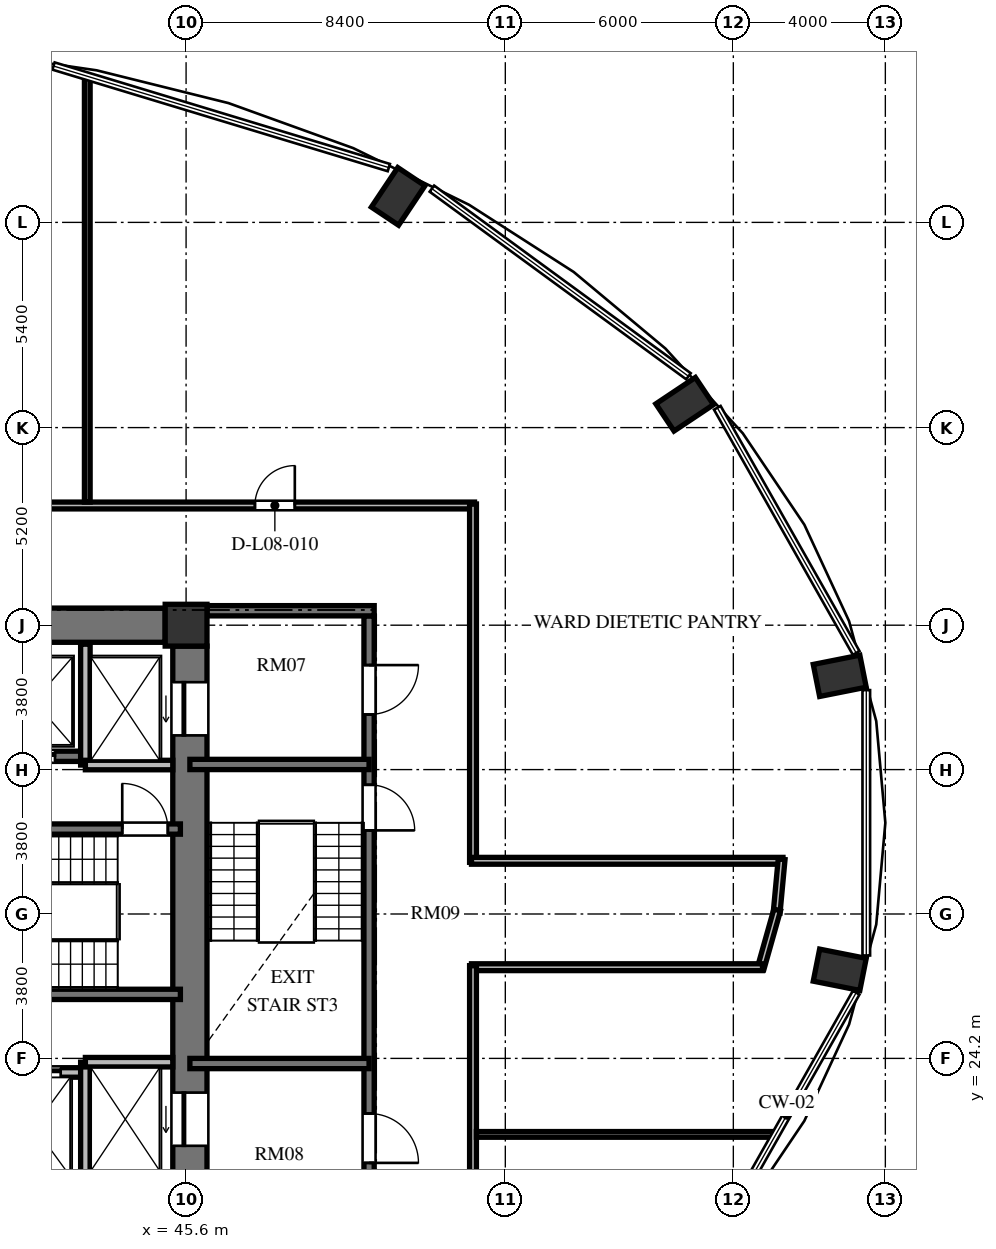
"""IFC4 building model, lengths in metres.
Left out: names, types, materials, properties, quantities, classifications, styles, units other than length and angle.
Written with IfcOpenShell. Run it as: python <this file> out.ifc"""

import sys

from ifc_helpers import new_model, si_unit, direction, frame, frame_2d, origin, origin_2d, place, context, subcontext, project, spatial, rectangle, extrude, element, fill, save


model = new_model("IFC4")
c1 = context("Model", 3, precision=1e-05, world=origin(), true_north=direction((0.0, 1.0)))
c2 = subcontext(c1, "Body", "Model", "MODEL_VIEW")
j1 = project(units=[si_unit("LENGTHUNIT", "METRE"), si_unit("PLANEANGLEUNIT", "RADIAN")], contexts=[c1])
p1 = place(None, origin())
s1 = spatial("IfcSite", under=j1, at=p1, CompositionType="ELEMENT")
p2 = place(p1, origin())
s2 = spatial("IfcBuilding", under=s1, at=p2, CompositionType="ELEMENT")
p3 = place(p2, frame((0.0, 0.0, 36.144)))
s3 = spatial("IfcBuildingStorey", under=s2, at=p3, CompositionType="ELEMENT", Elevation=36.144)
for number, where, z_axis, x_axis in (
    (1, (62.8, 26.532, 0.0), (0.0, 0.0, 1.0), (0.981, -0.195, 0.0)),
    (2, (62.8, 34.268, 0.0), (0.0, 0.0, 1.0), (0.981, 0.195, 0.0)),
    (3, (58.72, 41.414, 0.0), (0.0, 0.0, 1.0), (0.831, 0.556, 0.0)),
    (4, (51.181, 46.884, 0.0), (0.0, 0.0, 1.0), (0.556, 0.831, 0.0)),
):
    element("IfcColumn", number, at=place(p3, frame(where, z_axis=z_axis, x_axis=x_axis)), inside=s3, PredefinedType="COLUMN", context=c2, shape_type="SweptSolid", body=[
        extrude(rectangle(XDim=1.25, YDim=0.86, at=origin_2d()), origin(), (0.0, 0.0, 1.0), 3.648),
    ])
p4 = place(p3, frame((45.6, 35.6, 0.0), z_axis=(0.0, 0.0, 1.0), x_axis=(1.0, 0.0, 0.0)))
e5 = element("IfcColumn", 5, at=p4, inside=s3, PredefinedType="COLUMN", context=c2, shape_type="SweptSolid", body=[
    extrude(rectangle(XDim=1.1, YDim=1.1, at=origin_2d()), origin(), (0.0, 0.0, 1.0), 3.648),
])
p5 = place(p3, frame((45.7, 20.95, 0.0), z_axis=(0.0, 0.0, 1.0), x_axis=(0.0, 1.0, 0.0)))
e6 = element("IfcWall", 6, at=p5, inside=s3, PredefinedType="SHEAR", context=c2, shape_type="SweptSolid", body=[
    extrude(rectangle(XDim=14.1, YDim=0.9, at=frame_2d((7.05, 0.0))), origin(), (0.0, 0.0, 1.0), 3.648),
])
p6 = place(p5, frame((11.75, 0.0, 0.0)))
e7 = element("IfcOpeningElement", 7, at=p6, cuts=e6, PredefinedType="OPENING", context=c2, shape_type="SweptSolid", body=[
    extrude(rectangle(XDim=1.4, YDim=2.3, at=frame_2d((0.7, 1.15))), frame((0.0, 0.46, 0.0), z_axis=(0.0, -1.0, 0.0), x_axis=(1.0, 0.0, 0.0)), (0.0, 0.0, 1.0), 0.92),
])
p7 = place(p5, frame((0.95, 0.0, 0.0)))
e8 = element("IfcOpeningElement", 8, at=p7, cuts=e6, PredefinedType="OPENING", context=c2, shape_type="SweptSolid", body=[
    extrude(rectangle(XDim=1.4, YDim=2.3, at=frame_2d((0.7, 1.15))), frame((0.0, 0.46, 0.0), z_axis=(0.0, -1.0, 0.0), x_axis=(1.0, 0.0, 0.0)), (0.0, 0.0, 1.0), 0.92),
])
p8 = place(p3, frame((39.75, 35.6, 0.0), z_axis=(0.0, 0.0, 1.0), x_axis=(1.0, 0.0, 0.0)))
e9 = element("IfcWall", 9, at=p8, inside=s3, PredefinedType="SHEAR", context=c2, shape_type="SweptSolid", body=[
    extrude(rectangle(XDim=5.3, YDim=0.9, at=frame_2d((2.65, 0.0))), origin(), (0.0, 0.0, 1.0), 3.648),
])
p9 = place(p3, frame((37.465, 30.235, 0.0), z_axis=(0.0, 0.0, 1.0), x_axis=(1.0, 0.0, 0.0)))
e10 = element("IfcWall", 10, at=p9, inside=s3, PredefinedType="SHEAR", context=c2, shape_type="SweptSolid", body=[
    extrude(rectangle(XDim=7.985, YDim=0.27, at=frame_2d((3.992, 0.0))), origin(), (0.0, 0.0, 1.0), 3.648),
])
p10 = place(p9, frame((6.455, 0.0, 0.0)))
e11 = element("IfcOpeningElement", 11, at=p10, cuts=e10, PredefinedType="OPENING", context=c2, shape_type="SweptSolid", body=[
    extrude(rectangle(XDim=1.2, YDim=2.15, at=frame_2d((0.6, 1.075))), frame((0.0, 0.145, 0.0), z_axis=(0.0, -1.0, 0.0), x_axis=(1.0, 0.0, 0.0)), (0.0, 0.0, 1.0), 0.29),
])
p11 = place(p3, frame((37.465, 25.885, 0.0), z_axis=(0.0, 0.0, 1.0), x_axis=(1.0, 0.0, 0.0)))
e12 = element("IfcWall", 12, at=p11, inside=s3, PredefinedType="SHEAR", context=c2, shape_type="SweptSolid", body=[
    extrude(rectangle(XDim=7.985, YDim=0.27, at=frame_2d((3.992, 0.0))), origin(), (0.0, 0.0, 1.0), 3.648),
])
p12 = place(p3, frame((26.55, 32.15, 0.0), z_axis=(0.0, 0.0, 1.0), x_axis=(1.0, 0.0, 0.0)))
e13 = element("IfcWall", 13, at=p12, inside=s3, PredefinedType="SHEAR", context=c2, shape_type="SweptSolid", body=[
    extrude(rectangle(XDim=16.4, YDim=0.27, at=frame_2d((8.2, 0.0))), origin(), (0.0, 0.0, 1.0), 3.648),
])
p13 = place(p12, frame((1.1, 0.0, 0.0)))
e14 = element("IfcOpeningElement", 14, at=p13, cuts=e13, PredefinedType="OPENING", context=c2, shape_type="SweptSolid", body=[
    extrude(rectangle(XDim=1.1, YDim=2.2, at=frame_2d((0.55, 1.1))), frame((0.0, 0.145, 0.0), z_axis=(0.0, -1.0, 0.0), x_axis=(1.0, 0.0, 0.0)), (0.0, 0.0, 1.0), 0.29),
])
p14 = place(p12, frame((3.7, 0.0, 0.0)))
e15 = element("IfcOpeningElement", 15, at=p14, cuts=e13, PredefinedType="OPENING", context=c2, shape_type="SweptSolid", body=[
    extrude(rectangle(XDim=1.1, YDim=2.2, at=frame_2d((0.55, 1.1))), frame((0.0, 0.145, 0.0), z_axis=(0.0, -1.0, 0.0), x_axis=(1.0, 0.0, 0.0)), (0.0, 0.0, 1.0), 0.29),
])
p15 = place(p12, frame((6.5, 0.0, 0.0)))
e16 = element("IfcOpeningElement", 16, at=p15, cuts=e13, PredefinedType="OPENING", context=c2, shape_type="SweptSolid", body=[
    extrude(rectangle(XDim=1.1, YDim=2.2, at=frame_2d((0.55, 1.1))), frame((0.0, 0.145, 0.0), z_axis=(0.0, -1.0, 0.0), x_axis=(1.0, 0.0, 0.0)), (0.0, 0.0, 1.0), 0.29),
])
p16 = place(p12, frame((9.1, 0.0, 0.0)))
e17 = element("IfcOpeningElement", 17, at=p16, cuts=e13, PredefinedType="OPENING", context=c2, shape_type="SweptSolid", body=[
    extrude(rectangle(XDim=1.1, YDim=2.2, at=frame_2d((0.55, 1.1))), frame((0.0, 0.145, 0.0), z_axis=(0.0, -1.0, 0.0), x_axis=(1.0, 0.0, 0.0)), (0.0, 0.0, 1.0), 0.29),
])
p17 = place(p12, frame((11.9, 0.0, 0.0)))
e18 = element("IfcOpeningElement", 18, at=p17, cuts=e13, PredefinedType="OPENING", context=c2, shape_type="SweptSolid", body=[
    extrude(rectangle(XDim=1.1, YDim=2.2, at=frame_2d((0.55, 1.1))), frame((0.0, 0.145, 0.0), z_axis=(0.0, -1.0, 0.0), x_axis=(1.0, 0.0, 0.0)), (0.0, 0.0, 1.0), 0.29),
])
p18 = place(p12, frame((14.5, 0.0, 0.0)))
e19 = element("IfcOpeningElement", 19, at=p18, cuts=e13, PredefinedType="OPENING", context=c2, shape_type="SweptSolid", body=[
    extrude(rectangle(XDim=1.1, YDim=2.2, at=frame_2d((0.55, 1.1))), frame((0.0, 0.145, 0.0), z_axis=(0.0, -1.0, 0.0), x_axis=(1.0, 0.0, 0.0)), (0.0, 0.0, 1.0), 0.29),
])
p19 = place(p3, frame((26.75, 23.83, 0.0), z_axis=(0.0, 0.0, 1.0), x_axis=(1.0, 0.0, 0.0)))
e20 = element("IfcWall", 20, at=p19, inside=s3, PredefinedType="SOLIDWALL", context=c2, shape_type="SweptSolid", body=[
    extrude(rectangle(XDim=16.2, YDim=0.25, at=frame_2d((8.1, 0.0))), origin(), (0.0, 0.0, 1.0), 3.428),
])
p20 = place(p19, frame((0.9, 0.0, 0.0)))
e21 = element("IfcOpeningElement", 21, at=p20, cuts=e20, PredefinedType="OPENING", context=c2, shape_type="SweptSolid", body=[
    extrude(rectangle(XDim=1.1, YDim=2.2, at=frame_2d((0.55, 1.1))), frame((0.0, 0.135, 0.0), z_axis=(0.0, -1.0, 0.0), x_axis=(1.0, 0.0, 0.0)), (0.0, 0.0, 1.0), 0.27),
])
p21 = place(p19, frame((3.5, 0.0, 0.0)))
e22 = element("IfcOpeningElement", 22, at=p21, cuts=e20, PredefinedType="OPENING", context=c2, shape_type="SweptSolid", body=[
    extrude(rectangle(XDim=1.1, YDim=2.2, at=frame_2d((0.55, 1.1))), frame((0.0, 0.135, 0.0), z_axis=(0.0, -1.0, 0.0), x_axis=(1.0, 0.0, 0.0)), (0.0, 0.0, 1.0), 0.27),
])
p22 = place(p19, frame((6.3, 0.0, 0.0)))
e23 = element("IfcOpeningElement", 23, at=p22, cuts=e20, PredefinedType="OPENING", context=c2, shape_type="SweptSolid", body=[
    extrude(rectangle(XDim=1.1, YDim=2.2, at=frame_2d((0.55, 1.1))), frame((0.0, 0.135, 0.0), z_axis=(0.0, -1.0, 0.0), x_axis=(1.0, 0.0, 0.0)), (0.0, 0.0, 1.0), 0.27),
])
p23 = place(p19, frame((8.9, 0.0, 0.0)))
e24 = element("IfcOpeningElement", 24, at=p23, cuts=e20, PredefinedType="OPENING", context=c2, shape_type="SweptSolid", body=[
    extrude(rectangle(XDim=1.1, YDim=2.2, at=frame_2d((0.55, 1.1))), frame((0.0, 0.135, 0.0), z_axis=(0.0, -1.0, 0.0), x_axis=(1.0, 0.0, 0.0)), (0.0, 0.0, 1.0), 0.27),
])
p24 = place(p19, frame((11.7, 0.0, 0.0)))
e25 = element("IfcOpeningElement", 25, at=p24, cuts=e20, PredefinedType="OPENING", context=c2, shape_type="SweptSolid", body=[
    extrude(rectangle(XDim=1.1, YDim=2.2, at=frame_2d((0.55, 1.1))), frame((0.0, 0.135, 0.0), z_axis=(0.0, -1.0, 0.0), x_axis=(1.0, 0.0, 0.0)), (0.0, 0.0, 1.0), 0.27),
])
p25 = place(p19, frame((14.15, 0.0, 0.0)))
e26 = element("IfcOpeningElement", 26, at=p25, cuts=e20, PredefinedType="OPENING", context=c2, shape_type="SweptSolid", body=[
    extrude(rectangle(XDim=1.4, YDim=2.3, at=frame_2d((0.7, 1.15))), frame((0.0, 0.135, 0.0), z_axis=(0.0, -1.0, 0.0), x_axis=(1.0, 0.0, 0.0)), (0.0, 0.0, 1.0), 0.27),
])
p26 = place(p3, frame((42.95, 31.92, 0.0), z_axis=(0.0, 0.0, 1.0), x_axis=(0.0, 1.0, 0.0)))
e27 = element("IfcWall", 27, at=p26, inside=s3, PredefinedType="SOLIDWALL", context=c2, shape_type="SweptSolid", body=[
    extrude(rectangle(XDim=3.18, YDim=0.25, at=frame_2d((1.59, 0.0))), origin(), (0.0, 0.0, 1.0), 3.428),
])
p27 = place(p3, frame((42.95, 31.92, 0.0), z_axis=(0.0, 0.0, 1.0), x_axis=(1.0, 0.0, 0.0)))
e28 = element("IfcWall", 28, at=p27, inside=s3, PredefinedType="SOLIDWALL", context=c2, shape_type="SweptSolid", body=[
    extrude(rectangle(XDim=2.3, YDim=0.25, at=frame_2d((1.15, 0.0))), origin(), (0.0, 0.0, 1.0), 3.428),
])
p28 = place(p3, frame((42.95, 20.9, 0.0), z_axis=(0.0, 0.0, 1.0), x_axis=(0.0, 1.0, 0.0)))
e29 = element("IfcWall", 29, at=p28, inside=s3, PredefinedType="SOLIDWALL", context=c2, shape_type="SweptSolid", body=[
    extrude(rectangle(XDim=3.2, YDim=0.25, at=frame_2d((1.6, 0.0))), origin(), (0.0, 0.0, 1.0), 3.428),
])
p29 = place(p3, frame((42.95, 24.1, 0.0), z_axis=(0.0, 0.0, 1.0), x_axis=(1.0, 0.0, 0.0)))
e30 = element("IfcWall", 30, at=p29, inside=s3, PredefinedType="SOLIDWALL", context=c2, shape_type="SweptSolid", body=[
    extrude(rectangle(XDim=2.3, YDim=0.25, at=frame_2d((1.15, 0.0))), origin(), (0.0, 0.0, 1.0), 3.428),
])
p30 = place(p3, frame((50.415, 35.845, 0.0), z_axis=(0.0, 0.0, 1.0), x_axis=(0.0, -1.0, 0.0)))
e31 = element("IfcWall", 31, at=p30, inside=s3, PredefinedType="SHEAR", context=c2, shape_type="SweptSolid", body=[
    extrude(rectangle(XDim=15.825, YDim=0.27, at=frame_2d((7.913, 0.0))), origin(), (0.0, 0.0, 1.0), 3.648),
])
p31 = place(p30, frame((4.445, 0.0, 0.0)))
e32 = element("IfcOpeningElement", 32, at=p31, cuts=e31, PredefinedType="OPENING", context=c2, shape_type="SweptSolid", body=[
    extrude(rectangle(XDim=1.2, YDim=2.15, at=frame_2d((0.6, 1.075))), frame((0.0, 0.145, 0.0), z_axis=(0.0, -1.0, 0.0), x_axis=(1.0, 0.0, 0.0)), (0.0, 0.0, 1.0), 0.29),
])
p32 = place(p30, frame((1.295, 0.0, 0.0)))
e33 = element("IfcOpeningElement", 33, at=p32, cuts=e31, PredefinedType="OPENING", context=c2, shape_type="SweptSolid", body=[
    extrude(rectangle(XDim=1.3, YDim=2.2, at=frame_2d((0.65, 1.1))), frame((0.0, 0.145, 0.0), z_axis=(0.0, -1.0, 0.0), x_axis=(1.0, 0.0, 0.0)), (0.0, 0.0, 1.0), 0.29),
])
p33 = place(p30, frame((13.095, 0.0, 0.0)))
e34 = element("IfcOpeningElement", 34, at=p33, cuts=e31, PredefinedType="OPENING", context=c2, shape_type="SweptSolid", body=[
    extrude(rectangle(XDim=1.3, YDim=2.2, at=frame_2d((0.65, 1.1))), frame((0.0, 0.145, 0.0), z_axis=(0.0, -1.0, 0.0), x_axis=(1.0, 0.0, 0.0)), (0.0, 0.0, 1.0), 0.29),
])
p34 = place(p3, frame((46.15, 35.98, 0.0), z_axis=(0.0, 0.0, 1.0), x_axis=(1.0, 0.0, 0.0)))
e35 = element("IfcWall", 35, at=p34, inside=s3, PredefinedType="SHEAR", context=c2, shape_type="SweptSolid", body=[
    extrude(rectangle(XDim=4.4, YDim=0.27, at=frame_2d((2.2, 0.0))), origin(), (0.0, 0.0, 1.0), 3.648),
])
for number, where, z_axis, x_axis in (
    (36, (45.7, 31.935, 0.0), (0.0, 0.0, 1.0), (1.0, 0.0, 0.0)),
    (37, (45.7, 24.065, 0.0), (0.0, 0.0, 1.0), (1.0, 0.0, 0.0)),
):
    element("IfcWall", number, at=place(p3, frame(where, z_axis=z_axis, x_axis=x_axis)), inside=s3, PredefinedType="SHEAR", context=c2, shape_type="SweptSolid", body=[
        extrude(rectangle(XDim=4.715, YDim=0.27, at=frame_2d((2.357, 0.0))), origin(), (0.0, 0.0, 1.0), 3.648),
    ])
p35 = place(p3, frame((23.31, 38.75, 0.0), z_axis=(0.0, 0.0, 1.0), x_axis=(1.0, 0.0, 0.0)))
e38 = element("IfcWall", 38, at=p35, inside=s3, PredefinedType="PARTITIONING", context=c2, shape_type="SweptSolid", body=[
    extrude(rectangle(XDim=29.88, YDim=0.18, at=frame_2d((14.94, 0.0))), origin(), (0.0, 0.0, 1.0), 3.053),
])
p36 = place(p35, frame((24.101, 0.0, 0.0)))
e39 = element("IfcOpeningElement", 39, at=p36, cuts=e38, PredefinedType="OPENING", context=c2, shape_type="SweptSolid", body=[
    extrude(rectangle(XDim=1.05, YDim=2.15, at=frame_2d((0.525, 1.075))), frame((0.0, 0.1, 0.0), z_axis=(0.0, -1.0, 0.0), x_axis=(1.0, 0.0, 0.0)), (0.0, 0.0, 1.0), 0.2),
])
p37 = place(p35, frame((13.165, 0.0, 0.0)))
e40 = element("IfcOpeningElement", 40, at=p37, cuts=e38, PredefinedType="OPENING", context=c2, shape_type="SweptSolid", body=[
    extrude(rectangle(XDim=1.05, YDim=2.15, at=frame_2d((0.525, 1.075))), frame((0.0, 0.1, 0.0), z_axis=(0.0, -1.0, 0.0), x_axis=(1.0, 0.0, 0.0)), (0.0, 0.0, 1.0), 0.2),
])
p38 = place(p35, frame((4.479, 0.0, 0.0)))
e41 = element("IfcOpeningElement", 41, at=p38, cuts=e38, PredefinedType="OPENING", context=c2, shape_type="SweptSolid", body=[
    extrude(rectangle(XDim=1.05, YDim=2.15, at=frame_2d((0.525, 1.075))), frame((0.0, 0.1, 0.0), z_axis=(0.0, -1.0, 0.0), x_axis=(1.0, 0.0, 0.0)), (0.0, 0.0, 1.0), 0.2),
])
p39 = place(p3, frame((53.15, 38.79, 0.0), z_axis=(0.0, 0.0, 1.0), x_axis=(0.0, -1.0, 0.0)))
e42 = element("IfcWall", 42, at=p39, inside=s3, PredefinedType="PARTITIONING", context=c2, shape_type="SweptSolid", body=[
    extrude(rectangle(XDim=9.43, YDim=0.18, at=frame_2d((4.715, 0.0))), origin(), (0.0, 0.0, 1.0), 3.428),
])
p40 = place(p3, frame((53.11, 29.4, 0.0), z_axis=(0.0, 0.0, 1.0), x_axis=(1.0, 0.0, 0.0)))
e43 = element("IfcWall", 43, at=p40, inside=s3, PredefinedType="PARTITIONING", context=c2, shape_type="SweptSolid", body=[
    extrude(rectangle(XDim=8.197, YDim=0.18, at=frame_2d((4.098, 0.0))), origin(), (0.0, 0.0, 1.0), 3.428),
])
p41 = place(p3, frame((61.271, 29.44, 0.0), z_axis=(0.0, 0.0, 1.0), x_axis=(-0.092539930621, -0.995708974169, 0.0)))
e44 = element("IfcWall", 44, at=p41, inside=s3, PredefinedType="PARTITIONING", context=c2, shape_type="SweptSolid", body=[
    extrude(rectangle(XDim=1.417, YDim=0.18, at=frame_2d((0.708, 0.0))), origin(), (0.0, 0.0, 1.0), 3.428),
])
p42 = place(p3, frame((61.154, 28.107, 0.0), z_axis=(0.0, 0.0, 1.0), x_axis=(-0.271748942561, -0.962368179138, 0.0)))
e45 = element("IfcWall", 45, at=p42, inside=s3, PredefinedType="PARTITIONING", context=c2, shape_type="SweptSolid", body=[
    extrude(rectangle(XDim=1.606, YDim=0.18, at=frame_2d((0.803, 0.0))), origin(), (0.0, 0.0, 1.0), 3.428),
])
p43 = place(p3, frame((60.768, 26.6, 0.0), z_axis=(0.0, 0.0, 1.0), x_axis=(-1.0, 0.0, 0.0)))
e46 = element("IfcWall", 46, at=p43, inside=s3, PredefinedType="PARTITIONING", context=c2, shape_type="SweptSolid", body=[
    extrude(rectangle(XDim=7.658, YDim=0.18, at=frame_2d((3.829, 0.0))), origin(), (0.0, 0.0, 1.0), 3.428),
])
p44 = place(p3, frame((53.15, 26.64, 0.0), z_axis=(0.0, 0.0, 1.0), x_axis=(0.0, -1.0, 0.0)))
e47 = element("IfcWall", 47, at=p44, inside=s3, PredefinedType="PARTITIONING", context=c2, shape_type="SweptSolid", body=[
    extrude(rectangle(XDim=6.66, YDim=0.18, at=frame_2d((3.33, 0.0))), origin(), (0.0, 0.0, 1.0), 3.428),
])
p45 = place(p3, frame((53.24, 22.2, 0.0), z_axis=(0.0, 0.0, 1.0), x_axis=(1.0, 0.0, 0.0)))
e48 = element("IfcWall", 48, at=p45, inside=s3, PredefinedType="PARTITIONING", context=c2, shape_type="SweptSolid", body=[
    extrude(rectangle(XDim=7.875, YDim=0.15, at=frame_2d((3.938, 0.0))), origin(), (0.0, 0.0, 1.0), 3.428),
])
p46 = place(p3, frame((43.0, 38.84, 0.0), z_axis=(0.0, 0.0, 1.0), x_axis=(0.0, 1.0, 0.0)))
e49 = element("IfcWall", 49, at=p46, inside=s3, PredefinedType="PARTITIONING", context=c2, shape_type="SweptSolid", body=[
    extrude(rectangle(XDim=11.193, YDim=0.15, at=frame_2d((5.597, 0.0))), origin(), (0.0, 0.0, 1.0), 3.428),
])
p47 = place(p10, origin())
e50 = element("IfcDoor", 50, at=p47, inside=s3, OperationType="SINGLE_SWING_LEFT", PredefinedType="DOOR", context=c2, shape_type="SweptSolid", body=[
    extrude(rectangle(XDim=1.2, YDim=2.15, at=frame_2d((0.6, 1.075))), frame((0.0, 0.025, 0.0), z_axis=(0.0, -1.0, 0.0), x_axis=(1.0, 0.0, 0.0)), (0.0, 0.0, 1.0), 0.05),
])
fill(e11, e50)
p48 = place(p18, origin())
e51 = element("IfcDoor", 51, at=p48, inside=s3, OperationType="SLIDING_TO_LEFT", PredefinedType="DOOR", context=c2, shape_type="SweptSolid", body=[
    extrude(rectangle(XDim=1.1, YDim=2.2, at=frame_2d((0.55, 1.1))), frame((0.0, 0.025, 0.0), z_axis=(0.0, -1.0, 0.0), x_axis=(1.0, 0.0, 0.0)), (0.0, 0.0, 1.0), 0.05),
])
fill(e19, e51)
p49 = place(p6, origin())
e52 = element("IfcDoor", 52, at=p49, inside=s3, OperationType="SLIDING_TO_LEFT", PredefinedType="DOOR", context=c2, shape_type="SweptSolid", body=[
    extrude(rectangle(XDim=1.4, YDim=2.3, at=frame_2d((0.7, 1.15))), frame((0.0, 0.025, 0.0), z_axis=(0.0, -1.0, 0.0), x_axis=(1.0, 0.0, 0.0)), (0.0, 0.0, 1.0), 0.05),
])
fill(e7, e52)
p50 = place(p7, origin())
e53 = element("IfcDoor", 53, at=p50, inside=s3, OperationType="SLIDING_TO_LEFT", PredefinedType="DOOR", context=c2, shape_type="SweptSolid", body=[
    extrude(rectangle(XDim=1.4, YDim=2.3, at=frame_2d((0.7, 1.15))), frame((0.0, 0.025, 0.0), z_axis=(0.0, -1.0, 0.0), x_axis=(1.0, 0.0, 0.0)), (0.0, 0.0, 1.0), 0.05),
])
fill(e8, e53)
p51 = place(p25, origin())
e54 = element("IfcDoor", 54, at=p51, inside=s3, OperationType="SLIDING_TO_LEFT", PredefinedType="DOOR", context=c2, shape_type="SweptSolid", body=[
    extrude(rectangle(XDim=1.4, YDim=2.3, at=frame_2d((0.7, 1.15))), frame((0.0, 0.025, 0.0), z_axis=(0.0, -1.0, 0.0), x_axis=(1.0, 0.0, 0.0)), (0.0, 0.0, 1.0), 0.05),
])
fill(e26, e54)
p52 = place(p31, origin())
e55 = element("IfcDoor", 55, at=p52, inside=s3, OperationType="SINGLE_SWING_RIGHT", PredefinedType="DOOR", context=c2, shape_type="SweptSolid", body=[
    extrude(rectangle(XDim=1.2, YDim=2.15, at=frame_2d((0.6, 1.075))), frame((0.0, 0.025, 0.0), z_axis=(0.0, -1.0, 0.0), x_axis=(1.0, 0.0, 0.0)), (0.0, 0.0, 1.0), 0.05),
])
fill(e32, e55)
p53 = place(p32, origin())
e56 = element("IfcDoor", 56, at=p53, inside=s3, OperationType="SINGLE_SWING_LEFT", PredefinedType="DOOR", context=c2, shape_type="SweptSolid", body=[
    extrude(rectangle(XDim=1.3, YDim=2.2, at=frame_2d((0.65, 1.1))), frame((0.0, 0.025, 0.0), z_axis=(0.0, -1.0, 0.0), x_axis=(1.0, 0.0, 0.0)), (0.0, 0.0, 1.0), 0.05),
])
fill(e33, e56)
p54 = place(p33, origin())
e57 = element("IfcDoor", 57, at=p54, inside=s3, OperationType="SINGLE_SWING_RIGHT", PredefinedType="DOOR", context=c2, shape_type="SweptSolid", body=[
    extrude(rectangle(XDim=1.3, YDim=2.2, at=frame_2d((0.65, 1.1))), frame((0.0, 0.025, 0.0), z_axis=(0.0, -1.0, 0.0), x_axis=(1.0, 0.0, 0.0)), (0.0, 0.0, 1.0), 0.05),
])
fill(e34, e57)
p55 = place(p36, origin())
e58 = element("IfcDoor", 58, at=p55, inside=s3, OperationType="SINGLE_SWING_RIGHT", PredefinedType="DOOR", context=c2, shape_type="SweptSolid", body=[
    extrude(rectangle(XDim=1.05, YDim=2.15, at=frame_2d((0.525, 1.075))), frame((0.0, 0.025, 0.0), z_axis=(0.0, -1.0, 0.0), x_axis=(1.0, 0.0, 0.0)), (0.0, 0.0, 1.0), 0.05),
])
fill(e39, e58)
save(model, sys.argv[1])
